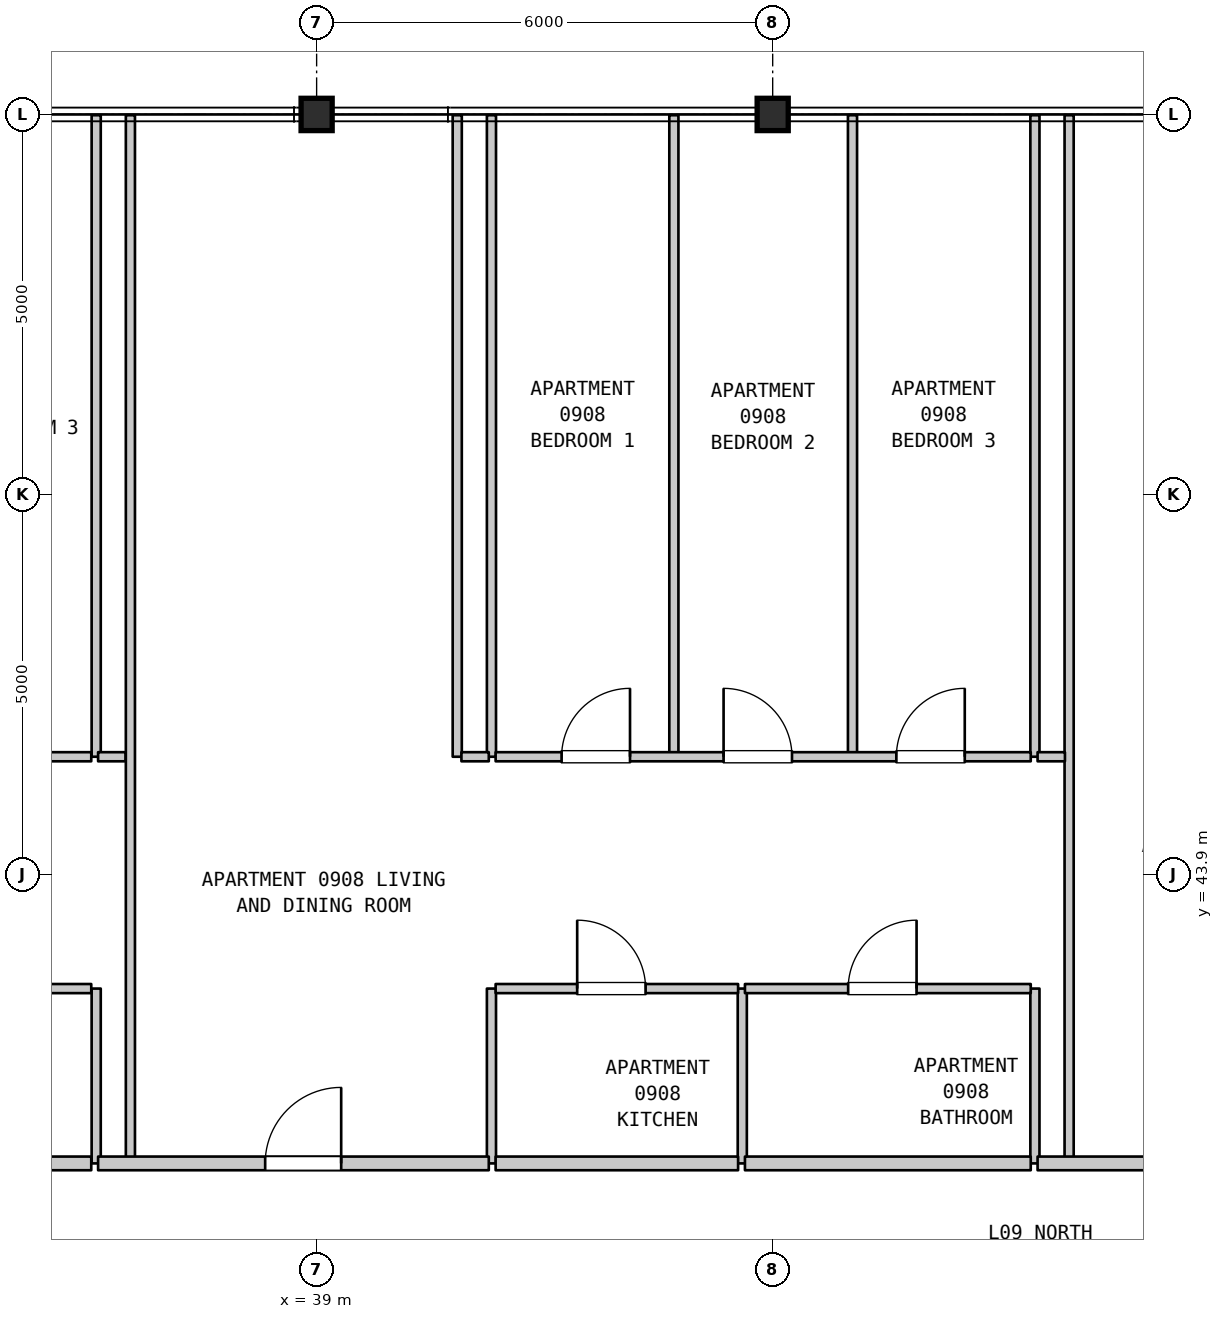
"""IFC4 building model, lengths in metres.
Left out: names, types, materials, properties, quantities, classifications, styles, units other than length and angle.
Written with IfcOpenShell. Run it as: python <this file> out.ifc"""

import sys

from ifc_helpers import new_model, si_unit, direction, frame, frame_2d, origin, origin_2d, place, context, subcontext, project, spatial, rectangle, i_section, extrude, element, fill, save


model = new_model("IFC4")
c1 = context("Model", 3, precision=1e-05, world=origin(), true_north=direction((0.0, 1.0)))
c2 = subcontext(c1, "Body", "Model", "MODEL_VIEW")
j1 = project(units=[si_unit("LENGTHUNIT", "METRE"), si_unit("PLANEANGLEUNIT", "RADIAN")], contexts=[c1])
p1 = place(None, origin())
s1 = spatial("IfcSite", under=j1, at=p1, CompositionType="ELEMENT")
p2 = place(p1, origin())
s2 = spatial("IfcBuilding", under=s1, at=p2, CompositionType="ELEMENT")
p3 = place(p2, frame((0.0, 0.0, 42.5)))
s3 = spatial("IfcBuildingStorey", under=s2, at=p3, CompositionType="ELEMENT", Elevation=42.5)
for number, where, z_axis, x_axis in (
    (1, (39.0, 53.9, 0.0), (0.0, 0.0, 1.0), (1.0, 0.0, 0.0)),
    (2, (45.0, 53.9, 0.0), (0.0, 0.0, 1.0), (1.0, 0.0, 0.0)),
):
    element("IfcColumn", number, at=place(p3, frame(where, z_axis=z_axis, x_axis=x_axis)), inside=s3, PredefinedType="COLUMN", context=c2, shape_type="SweptSolid", body=[
        extrude(i_section(OverallWidth=0.409, OverallDepth=0.425, WebThickness=0.032, FlangeThickness=0.052, FilletRadius=0.015, at=origin_2d()), origin(), (0.0, 0.0, 1.0), 3.7),
    ])
p4 = place(p3, frame((36.1, 40.1, 0.0), z_axis=(0.0, 0.0, 1.0), x_axis=(0.0, 1.0, 0.0)))
e3 = element("IfcWall", 3, at=p4, inside=s3, PredefinedType="PARTITIONING", context=c2, shape_type="SweptSolid", body=[
    extrude(rectangle(XDim=2.3, YDim=0.12, at=frame_2d((1.15, 0.0))), origin(), (0.0, 0.0, 1.0), 3.385),
])
p5 = place(p3, frame((36.1, 45.45, 0.0), z_axis=(0.0, 0.0, 1.0), x_axis=(0.0, 1.0, 0.0)))
e4 = element("IfcWall", 4, at=p5, inside=s3, PredefinedType="PARTITIONING", context=c2, shape_type="SweptSolid", body=[
    extrude(rectangle(XDim=8.44, YDim=0.12, at=frame_2d((4.22, 0.0))), origin(), (0.0, 0.0, 1.0), 3.385),
])
p6 = place(p3, frame((36.55, 40.1, 0.0), z_axis=(0.0, 0.0, 1.0), x_axis=(0.0, 1.0, 0.0)))
e5 = element("IfcWall", 5, at=p6, inside=s3, PredefinedType="PARTITIONING", context=c2, shape_type="SweptSolid", body=[
    extrude(rectangle(XDim=13.79, YDim=0.12, at=frame_2d((6.895, 0.0))), origin(), (0.0, 0.0, 1.0), 3.385),
])
p7 = place(p3, frame((40.85, 45.45, 0.0), z_axis=(0.0, 0.0, 1.0), x_axis=(0.0, 1.0, 0.0)))
e6 = element("IfcWall", 6, at=p7, inside=s3, PredefinedType="PARTITIONING", context=c2, shape_type="SweptSolid", body=[
    extrude(rectangle(XDim=8.44, YDim=0.12, at=frame_2d((4.22, 0.0))), origin(), (0.0, 0.0, 1.0), 3.385),
])
p8 = place(p3, frame((41.3, 40.1, 0.0), z_axis=(0.0, 0.0, 1.0), x_axis=(0.0, 1.0, 0.0)))
e7 = element("IfcWall", 7, at=p8, inside=s3, PredefinedType="PARTITIONING", context=c2, shape_type="SweptSolid", body=[
    extrude(rectangle(XDim=2.3, YDim=0.12, at=frame_2d((1.15, 0.0))), origin(), (0.0, 0.0, 1.0), 3.385),
])
for number, where, z_axis, x_axis in (
    (8, (41.3, 45.45, 0.0), (0.0, 0.0, 1.0), (0.0, 1.0, 0.0)),
    (9, (43.7, 45.45, 0.0), (0.0, 0.0, 1.0), (0.0, 1.0, 0.0)),
):
    element("IfcWall", number, at=place(p3, frame(where, z_axis=z_axis, x_axis=x_axis)), inside=s3, PredefinedType="PARTITIONING", context=c2, shape_type="SweptSolid", body=[
        extrude(rectangle(XDim=8.44, YDim=0.12, at=frame_2d((4.22, 0.0))), origin(), (0.0, 0.0, 1.0), 3.385),
    ])
p9 = place(p3, frame((44.6, 40.1, 0.0), z_axis=(0.0, 0.0, 1.0), x_axis=(0.0, 1.0, 0.0)))
e10 = element("IfcWall", 10, at=p9, inside=s3, PredefinedType="PARTITIONING", context=c2, shape_type="SweptSolid", body=[
    extrude(rectangle(XDim=2.3, YDim=0.12, at=frame_2d((1.15, 0.0))), origin(), (0.0, 0.0, 1.0), 3.385),
])
p10 = place(p3, frame((46.05, 45.45, 0.0), z_axis=(0.0, 0.0, 1.0), x_axis=(0.0, 1.0, 0.0)))
e11 = element("IfcWall", 11, at=p10, inside=s3, PredefinedType="PARTITIONING", context=c2, shape_type="SweptSolid", body=[
    extrude(rectangle(XDim=8.44, YDim=0.12, at=frame_2d((4.22, 0.0))), origin(), (0.0, 0.0, 1.0), 3.385),
])
p11 = place(p3, frame((48.45, 40.1, 0.0), z_axis=(0.0, 0.0, 1.0), x_axis=(0.0, 1.0, 0.0)))
e12 = element("IfcWall", 12, at=p11, inside=s3, PredefinedType="PARTITIONING", context=c2, shape_type="SweptSolid", body=[
    extrude(rectangle(XDim=2.3, YDim=0.12, at=frame_2d((1.15, 0.0))), origin(), (0.0, 0.0, 1.0), 3.385),
])
p12 = place(p3, frame((48.45, 45.45, 0.0), z_axis=(0.0, 0.0, 1.0), x_axis=(0.0, 1.0, 0.0)))
e13 = element("IfcWall", 13, at=p12, inside=s3, PredefinedType="PARTITIONING", context=c2, shape_type="SweptSolid", body=[
    extrude(rectangle(XDim=8.44, YDim=0.12, at=frame_2d((4.22, 0.0))), origin(), (0.0, 0.0, 1.0), 3.385),
])
p13 = place(p3, frame((48.9, 40.1, 0.0), z_axis=(0.0, 0.0, 1.0), x_axis=(0.0, 1.0, 0.0)))
e14 = element("IfcWall", 14, at=p13, inside=s3, PredefinedType="PARTITIONING", context=c2, shape_type="SweptSolid", body=[
    extrude(rectangle(XDim=13.79, YDim=0.12, at=frame_2d((6.895, 0.0))), origin(), (0.0, 0.0, 1.0), 3.385),
])
p14 = place(p3, frame((31.913, 40.1, 0.0), z_axis=(0.0, 0.0, 1.0), x_axis=(1.0, 0.0, 0.0)))
e15 = element("IfcWall", 15, at=p14, inside=s3, PredefinedType="STANDARD", context=c2, shape_type="SweptSolid", body=[
    extrude(rectangle(XDim=4.122, YDim=0.18, at=frame_2d((2.061, 0.0))), origin(), (0.0, 0.0, 1.0), 3.385),
])
p15 = place(p3, frame((36.125, 40.1, 0.0), z_axis=(0.0, 0.0, 1.0), x_axis=(1.0, 0.0, 0.0)))
e16 = element("IfcWall", 16, at=p15, inside=s3, PredefinedType="STANDARD", context=c2, shape_type="SweptSolid", body=[
    extrude(rectangle(XDim=5.14, YDim=0.18, at=frame_2d((2.57, 0.0))), origin(), (0.0, 0.0, 1.0), 3.385),
])
p16 = place(p15, frame((2.198, 0.0, 0.0)))
e17 = element("IfcOpeningElement", 17, at=p16, cuts=e16, PredefinedType="OPENING", context=c2, shape_type="SweptSolid", body=[
    extrude(rectangle(XDim=1.0, YDim=2.15, at=frame_2d((0.5, 1.075))), frame((0.0, 0.1, 0.0), z_axis=(0.0, -1.0, 0.0), x_axis=(1.0, 0.0, 0.0)), (0.0, 0.0, 1.0), 0.2),
])
p17 = place(p3, frame((41.355, 40.1, 0.0), z_axis=(0.0, 0.0, 1.0), x_axis=(1.0, 0.0, 0.0)))
e18 = element("IfcWall", 18, at=p17, inside=s3, PredefinedType="STANDARD", context=c2, shape_type="SweptSolid", body=[
    extrude(rectangle(XDim=3.19, YDim=0.18, at=frame_2d((1.595, 0.0))), origin(), (0.0, 0.0, 1.0), 3.385),
])
p18 = place(p3, frame((44.635, 40.1, 0.0), z_axis=(0.0, 0.0, 1.0), x_axis=(1.0, 0.0, 0.0)))
e19 = element("IfcWall", 19, at=p18, inside=s3, PredefinedType="STANDARD", context=c2, shape_type="SweptSolid", body=[
    extrude(rectangle(XDim=3.76, YDim=0.18, at=frame_2d((1.88, 0.0))), origin(), (0.0, 0.0, 1.0), 3.385),
])
p19 = place(p3, frame((48.485, 40.1, 0.0), z_axis=(0.0, 0.0, 1.0), x_axis=(1.0, 0.0, 0.0)))
e20 = element("IfcWall", 20, at=p19, inside=s3, PredefinedType="STANDARD", context=c2, shape_type="SweptSolid", body=[
    extrude(rectangle(XDim=5.1, YDim=0.18, at=frame_2d((2.55, 0.0))), origin(), (0.0, 0.0, 1.0), 3.385),
])
p20 = place(p19, frame((2.179, 0.0, 0.0)))
e21 = element("IfcOpeningElement", 21, at=p20, cuts=e20, PredefinedType="OPENING", context=c2, shape_type="SweptSolid", body=[
    extrude(rectangle(XDim=1.0, YDim=2.15, at=frame_2d((0.5, 1.075))), frame((0.0, 0.1, 0.0), z_axis=(0.0, -1.0, 0.0), x_axis=(1.0, 0.0, 0.0)), (0.0, 0.0, 1.0), 0.2),
])
p21 = place(p3, frame((31.913, 42.4, 0.0), z_axis=(0.0, 0.0, 1.0), x_axis=(1.0, 0.0, 0.0)))
e22 = element("IfcWall", 22, at=p21, inside=s3, PredefinedType="PARTITIONING", context=c2, shape_type="SweptSolid", body=[
    extrude(rectangle(XDim=4.122, YDim=0.12, at=frame_2d((2.061, 0.0))), origin(), (0.0, 0.0, 1.0), 3.385),
])
p22 = place(p21, frame((1.611, 0.0, 0.0)))
e23 = element("IfcOpeningElement", 23, at=p22, cuts=e22, PredefinedType="OPENING", context=c2, shape_type="SweptSolid", body=[
    extrude(rectangle(XDim=0.9, YDim=2.1, at=frame_2d((0.45, 1.05))), frame((0.0, 0.07, 0.0), z_axis=(0.0, -1.0, 0.0), x_axis=(1.0, 0.0, 0.0)), (0.0, 0.0, 1.0), 0.14),
])
p23 = place(p3, frame((41.355, 42.4, 0.0), z_axis=(0.0, 0.0, 1.0), x_axis=(1.0, 0.0, 0.0)))
e24 = element("IfcWall", 24, at=p23, inside=s3, PredefinedType="PARTITIONING", context=c2, shape_type="SweptSolid", body=[
    extrude(rectangle(XDim=3.19, YDim=0.12, at=frame_2d((1.595, 0.0))), origin(), (0.0, 0.0, 1.0), 3.385),
])
p24 = place(p23, frame((1.073, 0.0, 0.0)))
e25 = element("IfcOpeningElement", 25, at=p24, cuts=e24, PredefinedType="OPENING", context=c2, shape_type="SweptSolid", body=[
    extrude(rectangle(XDim=0.9, YDim=2.15, at=frame_2d((0.45, 1.075))), frame((0.0, 0.07, 0.0), z_axis=(0.0, -1.0, 0.0), x_axis=(1.0, 0.0, 0.0)), (0.0, 0.0, 1.0), 0.14),
])
p25 = place(p3, frame((44.635, 42.4, 0.0), z_axis=(0.0, 0.0, 1.0), x_axis=(1.0, 0.0, 0.0)))
e26 = element("IfcWall", 26, at=p25, inside=s3, PredefinedType="PARTITIONING", context=c2, shape_type="SweptSolid", body=[
    extrude(rectangle(XDim=3.76, YDim=0.12, at=frame_2d((1.88, 0.0))), origin(), (0.0, 0.0, 1.0), 3.385),
])
p26 = place(p25, frame((1.358, 0.0, 0.0)))
e27 = element("IfcOpeningElement", 27, at=p26, cuts=e26, PredefinedType="OPENING", context=c2, shape_type="SweptSolid", body=[
    extrude(rectangle(XDim=0.9, YDim=2.1, at=frame_2d((0.45, 1.05))), frame((0.0, 0.07, 0.0), z_axis=(0.0, -1.0, 0.0), x_axis=(1.0, 0.0, 0.0)), (0.0, 0.0, 1.0), 0.14),
])
p27 = place(p3, frame((28.325, 45.45, 0.0), z_axis=(0.0, 0.0, 1.0), x_axis=(1.0, 0.0, 0.0)))
e28 = element("IfcWall", 28, at=p27, inside=s3, PredefinedType="PARTITIONING", context=c2, shape_type="SweptSolid", body=[
    extrude(rectangle(XDim=7.71, YDim=0.12, at=frame_2d((3.855, 0.0))), origin(), (0.0, 0.0, 1.0), 3.385),
])
p28 = place(p27, frame((0.98, 0.0, 0.0)))
e29 = element("IfcOpeningElement", 29, at=p28, cuts=e28, PredefinedType="OPENING", context=c2, shape_type="SweptSolid", body=[
    extrude(rectangle(XDim=0.9, YDim=2.15, at=frame_2d((0.45, 1.075))), frame((0.0, 0.07, 0.0), z_axis=(0.0, -1.0, 0.0), x_axis=(1.0, 0.0, 0.0)), (0.0, 0.0, 1.0), 0.14),
])
p29 = place(p27, frame((3.405, 0.0, 0.0)))
e30 = element("IfcOpeningElement", 30, at=p29, cuts=e28, PredefinedType="OPENING", context=c2, shape_type="SweptSolid", body=[
    extrude(rectangle(XDim=0.9, YDim=2.15, at=frame_2d((0.45, 1.075))), frame((0.0, 0.07, 0.0), z_axis=(0.0, -1.0, 0.0), x_axis=(1.0, 0.0, 0.0)), (0.0, 0.0, 1.0), 0.14),
])
p30 = place(p27, frame((5.83, 0.0, 0.0)))
e31 = element("IfcOpeningElement", 31, at=p30, cuts=e28, PredefinedType="OPENING", context=c2, shape_type="SweptSolid", body=[
    extrude(rectangle(XDim=0.9, YDim=2.15, at=frame_2d((0.45, 1.075))), frame((0.0, 0.07, 0.0), z_axis=(0.0, -1.0, 0.0), x_axis=(1.0, 0.0, 0.0)), (0.0, 0.0, 1.0), 0.14),
])
p31 = place(p3, frame((36.125, 45.45, 0.0), z_axis=(0.0, 0.0, 1.0), x_axis=(1.0, 0.0, 0.0)))
e32 = element("IfcWall", 32, at=p31, inside=s3, PredefinedType="PARTITIONING", context=c2, shape_type="SweptSolid", body=[
    extrude(rectangle(XDim=0.36, YDim=0.12, at=frame_2d((0.18, 0.0))), origin(), (0.0, 0.0, 1.0), 3.385),
])
p32 = place(p3, frame((40.905, 45.45, 0.0), z_axis=(0.0, 0.0, 1.0), x_axis=(1.0, 0.0, 0.0)))
e33 = element("IfcWall", 33, at=p32, inside=s3, PredefinedType="PARTITIONING", context=c2, shape_type="SweptSolid", body=[
    extrude(rectangle(XDim=0.36, YDim=0.12, at=frame_2d((0.18, 0.0))), origin(), (0.0, 0.0, 1.0), 3.385),
])
p33 = place(p3, frame((41.355, 45.45, 0.0), z_axis=(0.0, 0.0, 1.0), x_axis=(1.0, 0.0, 0.0)))
e34 = element("IfcWall", 34, at=p33, inside=s3, PredefinedType="PARTITIONING", context=c2, shape_type="SweptSolid", body=[
    extrude(rectangle(XDim=7.04, YDim=0.12, at=frame_2d((3.52, 0.0))), origin(), (0.0, 0.0, 1.0), 3.385),
])
p34 = place(p33, frame((0.868, 0.0, 0.0)))
e35 = element("IfcOpeningElement", 35, at=p34, cuts=e34, PredefinedType="OPENING", context=c2, shape_type="SweptSolid", body=[
    extrude(rectangle(XDim=0.9, YDim=2.15, at=frame_2d((0.45, 1.075))), frame((0.0, 0.07, 0.0), z_axis=(0.0, -1.0, 0.0), x_axis=(1.0, 0.0, 0.0)), (0.0, 0.0, 1.0), 0.14),
])
p35 = place(p33, frame((2.999, 0.0, 0.0)))
e36 = element("IfcOpeningElement", 36, at=p35, cuts=e34, PredefinedType="OPENING", context=c2, shape_type="SweptSolid", body=[
    extrude(rectangle(XDim=0.9, YDim=2.15, at=frame_2d((0.45, 1.075))), frame((0.0, 0.07, 0.0), z_axis=(0.0, -1.0, 0.0), x_axis=(1.0, 0.0, 0.0)), (0.0, 0.0, 1.0), 0.14),
])
p36 = place(p33, frame((5.272, 0.0, 0.0)))
e37 = element("IfcOpeningElement", 37, at=p36, cuts=e34, PredefinedType="OPENING", context=c2, shape_type="SweptSolid", body=[
    extrude(rectangle(XDim=0.9, YDim=2.15, at=frame_2d((0.45, 1.075))), frame((0.0, 0.07, 0.0), z_axis=(0.0, -1.0, 0.0), x_axis=(1.0, 0.0, 0.0)), (0.0, 0.0, 1.0), 0.14),
])
p37 = place(p3, frame((48.485, 45.45, 0.0), z_axis=(0.0, 0.0, 1.0), x_axis=(1.0, 0.0, 0.0)))
e38 = element("IfcWall", 38, at=p37, inside=s3, PredefinedType="PARTITIONING", context=c2, shape_type="SweptSolid", body=[
    extrude(rectangle(XDim=0.36, YDim=0.12, at=frame_2d((0.18, 0.0))), origin(), (0.0, 0.0, 1.0), 3.385),
])
p38 = place(p16, origin())
e39 = element("IfcDoor", 39, at=p38, inside=s3, OperationType="SINGLE_SWING_RIGHT", PredefinedType="DOOR", context=c2, shape_type="SweptSolid", body=[
    extrude(rectangle(XDim=1.0, YDim=2.15, at=frame_2d((0.5, 1.075))), frame((0.0, 0.025, 0.0), z_axis=(0.0, -1.0, 0.0), x_axis=(1.0, 0.0, 0.0)), (0.0, 0.0, 1.0), 0.05),
])
fill(e17, e39)
p39 = place(p24, origin())
e40 = element("IfcDoor", 40, at=p39, inside=s3, OperationType="SINGLE_SWING_LEFT", PredefinedType="DOOR", context=c2, shape_type="SweptSolid", body=[
    extrude(rectangle(XDim=0.9, YDim=2.15, at=frame_2d((0.45, 1.075))), frame((0.0, 0.025, 0.0), z_axis=(0.0, -1.0, 0.0), x_axis=(1.0, 0.0, 0.0)), (0.0, 0.0, 1.0), 0.05),
])
fill(e25, e40)
p40 = place(p26, origin())
e41 = element("IfcDoor", 41, at=p40, inside=s3, OperationType="SINGLE_SWING_RIGHT", PredefinedType="DOOR", context=c2, shape_type="SweptSolid", body=[
    extrude(rectangle(XDim=0.9, YDim=2.1, at=frame_2d((0.45, 1.05))), frame((0.0, 0.025, 0.0), z_axis=(0.0, -1.0, 0.0), x_axis=(1.0, 0.0, 0.0)), (0.0, 0.0, 1.0), 0.05),
])
fill(e27, e41)
p41 = place(p34, origin())
e42 = element("IfcDoor", 42, at=p41, inside=s3, OperationType="SINGLE_SWING_RIGHT", PredefinedType="DOOR", context=c2, shape_type="SweptSolid", body=[
    extrude(rectangle(XDim=0.9, YDim=2.15, at=frame_2d((0.45, 1.075))), frame((0.0, 0.025, 0.0), z_axis=(0.0, -1.0, 0.0), x_axis=(1.0, 0.0, 0.0)), (0.0, 0.0, 1.0), 0.05),
])
fill(e35, e42)
p42 = place(p35, origin())
e43 = element("IfcDoor", 43, at=p42, inside=s3, OperationType="SINGLE_SWING_LEFT", PredefinedType="DOOR", context=c2, shape_type="SweptSolid", body=[
    extrude(rectangle(XDim=0.9, YDim=2.15, at=frame_2d((0.45, 1.075))), frame((0.0, 0.025, 0.0), z_axis=(0.0, -1.0, 0.0), x_axis=(1.0, 0.0, 0.0)), (0.0, 0.0, 1.0), 0.05),
])
fill(e36, e43)
p43 = place(p36, origin())
e44 = element("IfcDoor", 44, at=p43, inside=s3, OperationType="SINGLE_SWING_RIGHT", PredefinedType="DOOR", context=c2, shape_type="SweptSolid", body=[
    extrude(rectangle(XDim=0.9, YDim=2.15, at=frame_2d((0.45, 1.075))), frame((0.0, 0.025, 0.0), z_axis=(0.0, -1.0, 0.0), x_axis=(1.0, 0.0, 0.0)), (0.0, 0.0, 1.0), 0.05),
])
fill(e37, e44)
save(model, sys.argv[1])
